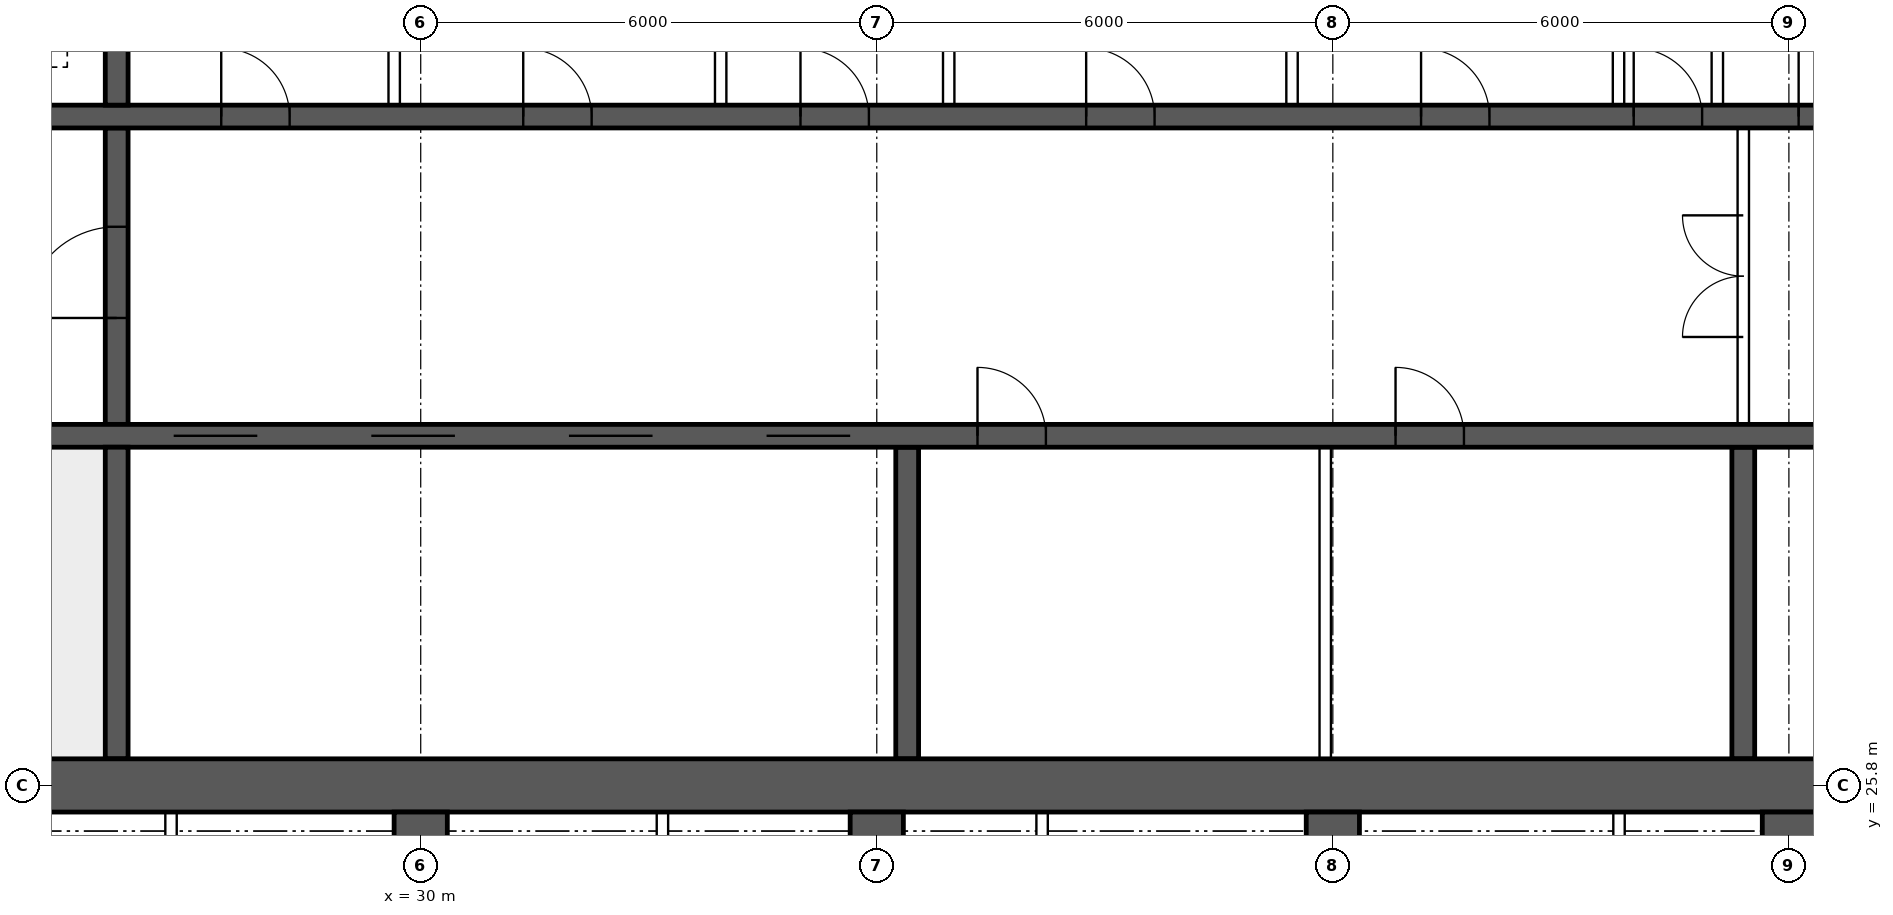
"""IFC4 building model, lengths in metres.
Left out: names, types, materials, properties, quantities, classifications, styles, units other than length and angle.
Written with IfcOpenShell. Run it as: python <this file> out.ifc"""

import sys

from ifc_helpers import new_model, si_unit, direction, frame, frame_2d, origin, place, context, subcontext, project, spatial, rectangle, extrude, element, fill, save


model = new_model("IFC4")
c1 = context("Model", 3, precision=1e-05, world=origin(), true_north=direction((0.0, 1.0)))
c2 = subcontext(c1, "Body", "Model", "MODEL_VIEW")
j1 = project(units=[si_unit("LENGTHUNIT", "METRE"), si_unit("PLANEANGLEUNIT", "RADIAN")], contexts=[c1])
p1 = place(None, origin())
s1 = spatial("IfcSite", under=j1, at=p1, CompositionType="ELEMENT")
p2 = place(p1, origin())
s2 = spatial("IfcBuilding", under=s1, at=p2, CompositionType="ELEMENT")
p3 = place(p2, frame((0.0, 0.0, 242.8)))
s3 = spatial("IfcBuildingStorey", under=s2, at=p3, CompositionType="ELEMENT", Elevation=242.8)
p4 = place(p3, frame((18.0, 25.8, 0.0), z_axis=(0.0, 0.0, 1.0), x_axis=(1.0, 0.0, 0.0)))
e1 = element("IfcWall", 1, at=p4, inside=s3, PredefinedType="SHEAR", context=c2, shape_type="SweptSolid", body=[
    extrude(rectangle(XDim=48.0, YDim=0.7, at=frame_2d((24.0, 0.0))), origin(), (0.0, 0.0, 1.0), 3.75),
])
p5 = place(p3, frame((18.35, 30.4, 0.0), z_axis=(0.0, 0.0, 1.0), x_axis=(1.0, 0.0, 0.0)))
e2 = element("IfcWall", 2, at=p5, inside=s3, PredefinedType="SHEAR", context=c2, shape_type="SweptSolid", body=[
    extrude(rectangle(XDim=47.3, YDim=0.3, at=frame_2d((23.65, 0.0))), origin(), (0.0, 0.0, 1.0), 3.75),
])
p6 = place(p5, frame((0.4, 0.0, 0.0)))
e3 = element("IfcOpeningElement", 3, at=p6, cuts=e2, PredefinedType="OPENING", context=c2, shape_type="SweptSolid", body=[
    extrude(rectangle(XDim=1.0, YDim=2.1, at=frame_2d((0.5, 1.05))), frame((0.0, 0.16, 0.0), z_axis=(0.0, -1.0, 0.0), x_axis=(1.0, 0.0, 0.0)), (0.0, 0.0, 1.0), 0.32),
])
p7 = place(p5, frame((45.9, 0.0, 0.0)))
e4 = element("IfcOpeningElement", 4, at=p7, cuts=e2, PredefinedType="OPENING", context=c2, shape_type="SweptSolid", body=[
    extrude(rectangle(XDim=1.0, YDim=2.1, at=frame_2d((0.5, 1.05))), frame((0.0, 0.16, 0.0), z_axis=(0.0, -1.0, 0.0), x_axis=(1.0, 0.0, 0.0)), (0.0, 0.0, 1.0), 0.32),
])
p8 = place(p5, frame((8.4, 0.0, 0.0)))
e5 = element("IfcOpeningElement", 5, at=p8, cuts=e2, PredefinedType="OPENING", context=c2, shape_type="SweptSolid", body=[
    extrude(rectangle(XDim=1.1, YDim=2.1, at=frame_2d((0.55, 1.05))), frame((0.0, 0.16, 0.0), z_axis=(0.0, -1.0, 0.0), x_axis=(1.0, 0.0, 0.0)), (0.0, 0.0, 1.0), 0.32),
])
p9 = place(p5, frame((11.0, 0.0, 0.0)))
e6 = element("IfcOpeningElement", 6, at=p9, cuts=e2, PredefinedType="OPENING", context=c2, shape_type="SweptSolid", body=[
    extrude(rectangle(XDim=1.1, YDim=2.1, at=frame_2d((0.55, 1.05))), frame((0.0, 0.16, 0.0), z_axis=(0.0, -1.0, 0.0), x_axis=(1.0, 0.0, 0.0)), (0.0, 0.0, 1.0), 0.32),
])
p10 = place(p5, frame((13.6, 0.0, 0.0)))
e7 = element("IfcOpeningElement", 7, at=p10, cuts=e2, PredefinedType="OPENING", context=c2, shape_type="SweptSolid", body=[
    extrude(rectangle(XDim=1.1, YDim=2.1, at=frame_2d((0.55, 1.05))), frame((0.0, 0.16, 0.0), z_axis=(0.0, -1.0, 0.0), x_axis=(1.0, 0.0, 0.0)), (0.0, 0.0, 1.0), 0.32),
])
p11 = place(p5, frame((16.2, 0.0, 0.0)))
e8 = element("IfcOpeningElement", 8, at=p11, cuts=e2, PredefinedType="OPENING", context=c2, shape_type="SweptSolid", body=[
    extrude(rectangle(XDim=1.1, YDim=2.1, at=frame_2d((0.55, 1.05))), frame((0.0, 0.16, 0.0), z_axis=(0.0, -1.0, 0.0), x_axis=(1.0, 0.0, 0.0)), (0.0, 0.0, 1.0), 0.32),
])
p12 = place(p5, frame((18.975, 0.0, 0.0)))
e9 = element("IfcOpeningElement", 9, at=p12, cuts=e2, PredefinedType="OPENING", context=c2, shape_type="SweptSolid", body=[
    extrude(rectangle(XDim=0.9, YDim=2.1, at=frame_2d((0.45, 1.05))), frame((0.0, 0.16, 0.0), z_axis=(0.0, -1.0, 0.0), x_axis=(1.0, 0.0, 0.0)), (0.0, 0.0, 1.0), 0.32),
])
p13 = place(p5, frame((24.475, 0.0, 0.0)))
e10 = element("IfcOpeningElement", 10, at=p13, cuts=e2, PredefinedType="OPENING", context=c2, shape_type="SweptSolid", body=[
    extrude(rectangle(XDim=0.9, YDim=2.1, at=frame_2d((0.45, 1.05))), frame((0.0, 0.16, 0.0), z_axis=(0.0, -1.0, 0.0), x_axis=(1.0, 0.0, 0.0)), (0.0, 0.0, 1.0), 0.32),
])
p14 = place(p5, frame((30.267, 0.0, 0.0)))
e11 = element("IfcOpeningElement", 11, at=p14, cuts=e2, PredefinedType="OPENING", context=c2, shape_type="SweptSolid", body=[
    extrude(rectangle(XDim=1.1, YDim=2.1, at=frame_2d((0.55, 1.05))), frame((0.0, 0.16, 0.0), z_axis=(0.0, -1.0, 0.0), x_axis=(1.0, 0.0, 0.0)), (0.0, 0.0, 1.0), 0.32),
])
p15 = place(p5, frame((33.8, 0.0, 0.0)))
e12 = element("IfcOpeningElement", 12, at=p15, cuts=e2, PredefinedType="OPENING", context=c2, shape_type="SweptSolid", body=[
    extrude(rectangle(XDim=1.1, YDim=2.1, at=frame_2d((0.55, 1.05))), frame((0.0, 0.16, 0.0), z_axis=(0.0, -1.0, 0.0), x_axis=(1.0, 0.0, 0.0)), (0.0, 0.0, 1.0), 0.32),
])
p16 = place(p5, frame((37.333, 0.0, 0.0)))
e13 = element("IfcOpeningElement", 13, at=p16, cuts=e2, PredefinedType="OPENING", context=c2, shape_type="SweptSolid", body=[
    extrude(rectangle(XDim=1.1, YDim=2.1, at=frame_2d((0.55, 1.05))), frame((0.0, 0.16, 0.0), z_axis=(0.0, -1.0, 0.0), x_axis=(1.0, 0.0, 0.0)), (0.0, 0.0, 1.0), 0.32),
])
p17 = place(p3, frame((18.35, 34.6, 0.0), z_axis=(0.0, 0.0, 1.0), x_axis=(1.0, 0.0, 0.0)))
e14 = element("IfcWall", 14, at=p17, inside=s3, PredefinedType="SHEAR", context=c2, shape_type="SweptSolid", body=[
    extrude(rectangle(XDim=47.3, YDim=0.3, at=frame_2d((23.65, 0.0))), origin(), (0.0, 0.0, 1.0), 3.75),
])
p18 = place(p17, frame((0.9, 0.0, 0.0)))
e15 = element("IfcOpeningElement", 15, at=p18, cuts=e14, PredefinedType="OPENING", context=c2, shape_type="SweptSolid", body=[
    extrude(rectangle(XDim=1.1, YDim=2.1, at=frame_2d((0.55, 1.05))), frame((0.0, 0.16, 0.0), z_axis=(0.0, -1.0, 0.0), x_axis=(1.0, 0.0, 0.0)), (0.0, 0.0, 1.0), 0.32),
])
p19 = place(p17, frame((45.3, 0.0, 0.0)))
e16 = element("IfcOpeningElement", 16, at=p19, cuts=e14, PredefinedType="OPENING", context=c2, shape_type="SweptSolid", body=[
    extrude(rectangle(XDim=1.1, YDim=2.1, at=frame_2d((0.55, 1.05))), frame((0.0, 0.16, 0.0), z_axis=(0.0, -1.0, 0.0), x_axis=(1.0, 0.0, 0.0)), (0.0, 0.0, 1.0), 0.32),
])
p20 = place(p17, frame((4.25, 0.0, 0.0)))
e17 = element("IfcOpeningElement", 17, at=p20, cuts=e14, PredefinedType="OPENING", context=c2, shape_type="SweptSolid", body=[
    extrude(rectangle(XDim=0.9, YDim=2.1, at=frame_2d((0.45, 1.05))), frame((0.0, 0.16, 0.0), z_axis=(0.0, -1.0, 0.0), x_axis=(1.0, 0.0, 0.0)), (0.0, 0.0, 1.0), 0.32),
])
p21 = place(p17, frame((42.15, 0.0, 0.0)))
e18 = element("IfcOpeningElement", 18, at=p21, cuts=e14, PredefinedType="OPENING", context=c2, shape_type="SweptSolid", body=[
    extrude(rectangle(XDim=0.9, YDim=2.1, at=frame_2d((0.45, 1.05))), frame((0.0, 0.16, 0.0), z_axis=(0.0, -1.0, 0.0), x_axis=(1.0, 0.0, 0.0)), (0.0, 0.0, 1.0), 0.32),
])
p22 = place(p17, frame((9.025, 0.0, 0.0)))
e19 = element("IfcOpeningElement", 19, at=p22, cuts=e14, PredefinedType="OPENING", context=c2, shape_type="SweptSolid", body=[
    extrude(rectangle(XDim=0.9, YDim=2.1, at=frame_2d((0.45, 1.05))), frame((0.0, 0.16, 0.0), z_axis=(0.0, -1.0, 0.0), x_axis=(1.0, 0.0, 0.0)), (0.0, 0.0, 1.0), 0.32),
])
p23 = place(p17, frame((12.999, 0.0, 0.0)))
e20 = element("IfcOpeningElement", 20, at=p23, cuts=e14, PredefinedType="OPENING", context=c2, shape_type="SweptSolid", body=[
    extrude(rectangle(XDim=0.9, YDim=2.1, at=frame_2d((0.45, 1.05))), frame((0.0, 0.16, 0.0), z_axis=(0.0, -1.0, 0.0), x_axis=(1.0, 0.0, 0.0)), (0.0, 0.0, 1.0), 0.32),
])
p24 = place(p17, frame((16.646, 0.0, 0.0)))
e21 = element("IfcOpeningElement", 21, at=p24, cuts=e14, PredefinedType="OPENING", context=c2, shape_type="SweptSolid", body=[
    extrude(rectangle(XDim=0.9, YDim=2.1, at=frame_2d((0.45, 1.05))), frame((0.0, 0.16, 0.0), z_axis=(0.0, -1.0, 0.0), x_axis=(1.0, 0.0, 0.0)), (0.0, 0.0, 1.0), 0.32),
])
p25 = place(p17, frame((20.405, 0.0, 0.0)))
e22 = element("IfcOpeningElement", 22, at=p25, cuts=e14, PredefinedType="OPENING", context=c2, shape_type="SweptSolid", body=[
    extrude(rectangle(XDim=0.9, YDim=2.1, at=frame_2d((0.45, 1.05))), frame((0.0, 0.16, 0.0), z_axis=(0.0, -1.0, 0.0), x_axis=(1.0, 0.0, 0.0)), (0.0, 0.0, 1.0), 0.32),
])
p26 = place(p17, frame((24.811, 0.0, 0.0)))
e23 = element("IfcOpeningElement", 23, at=p26, cuts=e14, PredefinedType="OPENING", context=c2, shape_type="SweptSolid", body=[
    extrude(rectangle(XDim=0.9, YDim=2.1, at=frame_2d((0.45, 1.05))), frame((0.0, 0.16, 0.0), z_axis=(0.0, -1.0, 0.0), x_axis=(1.0, 0.0, 0.0)), (0.0, 0.0, 1.0), 0.32),
])
p27 = place(p17, frame((27.608, 0.0, 0.0)))
e24 = element("IfcOpeningElement", 24, at=p27, cuts=e14, PredefinedType="OPENING", context=c2, shape_type="SweptSolid", body=[
    extrude(rectangle(XDim=0.9, YDim=2.1, at=frame_2d((0.45, 1.05))), frame((0.0, 0.16, 0.0), z_axis=(0.0, -1.0, 0.0), x_axis=(1.0, 0.0, 0.0)), (0.0, 0.0, 1.0), 0.32),
])
p28 = place(p17, frame((29.778, 0.0, 0.0)))
e25 = element("IfcOpeningElement", 25, at=p28, cuts=e14, PredefinedType="OPENING", context=c2, shape_type="SweptSolid", body=[
    extrude(rectangle(XDim=0.9, YDim=2.1, at=frame_2d((0.45, 1.05))), frame((0.0, 0.16, 0.0), z_axis=(0.0, -1.0, 0.0), x_axis=(1.0, 0.0, 0.0)), (0.0, 0.0, 1.0), 0.32),
])
p29 = place(p17, frame((33.577, 0.0, 0.0)))
e26 = element("IfcOpeningElement", 26, at=p29, cuts=e14, PredefinedType="OPENING", context=c2, shape_type="SweptSolid", body=[
    extrude(rectangle(XDim=0.9, YDim=2.1, at=frame_2d((0.45, 1.05))), frame((0.0, 0.16, 0.0), z_axis=(0.0, -1.0, 0.0), x_axis=(1.0, 0.0, 0.0)), (0.0, 0.0, 1.0), 0.32),
])
p30 = place(p17, frame((37.528, 0.0, 0.0)))
e27 = element("IfcOpeningElement", 27, at=p30, cuts=e14, PredefinedType="OPENING", context=c2, shape_type="SweptSolid", body=[
    extrude(rectangle(XDim=0.9, YDim=2.1, at=frame_2d((0.45, 1.05))), frame((0.0, 0.16, 0.0), z_axis=(0.0, -1.0, 0.0), x_axis=(1.0, 0.0, 0.0)), (0.0, 0.0, 1.0), 0.32),
])
p31 = place(p3, frame((26.0, 26.15, 0.0), z_axis=(0.0, 0.0, 1.0), x_axis=(0.0, 1.0, 0.0)))
e28 = element("IfcWall", 28, at=p31, inside=s3, PredefinedType="SHEAR", context=c2, shape_type="SweptSolid", body=[
    extrude(rectangle(XDim=4.1, YDim=0.3, at=frame_2d((2.05, 0.0))), origin(), (0.0, 0.0, 1.0), 3.75),
])
p32 = place(p3, frame((26.0, 30.55, 0.0), z_axis=(0.0, 0.0, 1.0), x_axis=(0.0, 1.0, 0.0)))
e29 = element("IfcWall", 29, at=p32, inside=s3, PredefinedType="SHEAR", context=c2, shape_type="SweptSolid", body=[
    extrude(rectangle(XDim=3.9, YDim=0.3, at=frame_2d((1.95, 0.0))), origin(), (0.0, 0.0, 1.0), 3.75),
])
p33 = place(p32, frame((1.4, 0.0, 0.0)))
e30 = element("IfcOpeningElement", 30, at=p33, cuts=e29, PredefinedType="OPENING", context=c2, shape_type="SweptSolid", body=[
    extrude(rectangle(XDim=1.2, YDim=2.1, at=frame_2d((0.6, 1.05))), frame((0.0, 0.16, 0.0), z_axis=(0.0, -1.0, 0.0), x_axis=(1.0, 0.0, 0.0)), (0.0, 0.0, 1.0), 0.32),
])
p34 = place(p3, frame((26.0, 34.75, 0.0), z_axis=(0.0, 0.0, 1.0), x_axis=(0.0, 1.0, 0.0)))
e31 = element("IfcWall", 31, at=p34, inside=s3, PredefinedType="SHEAR", context=c2, shape_type="SweptSolid", body=[
    extrude(rectangle(XDim=3.1, YDim=0.3, at=frame_2d((1.55, 0.0))), origin(), (0.0, 0.0, 1.0), 3.75),
])
for number, where, z_axis, x_axis in (
    (32, (36.4, 26.15, 0.0), (0.0, 0.0, 1.0), (0.0, 1.0, 0.0)),
    (33, (47.4, 26.15, 0.0), (0.0, 0.0, 1.0), (0.0, 1.0, 0.0)),
):
    element("IfcWall", number, at=place(p3, frame(where, z_axis=z_axis, x_axis=x_axis)), inside=s3, PredefinedType="SHEAR", context=c2, shape_type="SweptSolid", body=[
        extrude(rectangle(XDim=4.1, YDim=0.3, at=frame_2d((2.05, 0.0))), origin(), (0.0, 0.0, 1.0), 3.75),
    ])
for number, where, z_axis, x_axis in (
    (34, (30.0, 18.4, 0.0), (0.0, 0.0, 1.0), (0.0, 1.0, 0.0)),
    (35, (36.0, 18.4, 0.0), (0.0, 0.0, 1.0), (0.0, 1.0, 0.0)),
    (36, (42.0, 18.4, 0.0), (0.0, 0.0, 1.0), (0.0, 1.0, 0.0)),
    (37, (48.0, 18.4, 0.0), (0.0, 0.0, 1.0), (0.0, 1.0, 0.0)),
):
    element("IfcWall", number, at=place(p3, frame(where, z_axis=z_axis, x_axis=x_axis)), inside=s3, PredefinedType="SHEAR", context=c2, shape_type="SweptSolid", body=[
        extrude(rectangle(XDim=7.05, YDim=0.7, at=frame_2d((3.525, 0.0))), origin(), (0.0, 0.0, 1.0), 3.75),
    ])
p35 = place(p3, frame((47.4, 30.55, 0.0), z_axis=(0.0, 0.0, 1.0), x_axis=(0.0, 1.0, 0.0)))
e38 = element("IfcWall", 38, at=p35, inside=s3, PredefinedType="SOLIDWALL", context=c2, shape_type="SweptSolid", body=[
    extrude(rectangle(XDim=3.9, YDim=0.15, at=frame_2d((1.95, 0.0))), origin(), (0.0, 0.0, 1.0), 3.3),
])
p36 = place(p35, frame((1.15, 0.0, 0.0)))
e39 = element("IfcOpeningElement", 39, at=p36, cuts=e38, PredefinedType="OPENING", context=c2, shape_type="SweptSolid", body=[
    extrude(rectangle(XDim=1.6, YDim=2.1, at=frame_2d((0.8, 1.05))), frame((0.0, 0.085, 0.0), z_axis=(0.0, -1.0, 0.0), x_axis=(1.0, 0.0, 0.0)), (0.0, 0.0, 1.0), 0.17),
])
for number, where, z_axis, x_axis in (
    (40, (29.651, 34.75, 0.0), (0.0, 0.0, 1.0), (0.0, 1.0, 0.0)),
    (41, (33.946, 34.75, 0.0), (0.0, 0.0, 1.0), (0.0, 1.0, 0.0)),
    (42, (36.946, 34.75, 0.0), (0.0, 0.0, 1.0), (0.0, 1.0, 0.0)),
    (43, (41.463, 34.75, 0.0), (0.0, 0.0, 1.0), (0.0, 1.0, 0.0)),
    (44, (45.758, 34.75, 0.0), (0.0, 0.0, 1.0), (0.0, 1.0, 0.0)),
    (45, (47.058, 34.75, 0.0), (0.0, 0.0, 1.0), (0.0, 1.0, 0.0)),
):
    element("IfcWall", number, at=place(p3, frame(where, z_axis=z_axis, x_axis=x_axis)), inside=s3, PredefinedType="SOLIDWALL", context=c2, shape_type="SweptSolid", body=[
        extrude(rectangle(XDim=3.1, YDim=0.15, at=frame_2d((1.55, 0.0))), origin(), (0.0, 0.0, 1.0), 3.3),
    ])
p37 = place(p3, frame((41.9, 26.15, 0.0), z_axis=(0.0, 0.0, 1.0), x_axis=(0.0, 1.0, 0.0)))
e46 = element("IfcWall", 46, at=p37, inside=s3, PredefinedType="SOLIDWALL", context=c2, shape_type="SweptSolid", body=[
    extrude(rectangle(XDim=4.1, YDim=0.15, at=frame_2d((2.05, 0.0))), origin(), (0.0, 0.0, 1.0), 3.3),
])
for number, where, z_axis, x_axis in (
    (47, (26.715, 18.5, 0.0), (0.0, 0.0, 1.0), (0.0, 1.0, 0.0)),
    (48, (33.18, 18.5, 0.0), (0.0, 0.0, 1.0), (0.0, 1.0, 0.0)),
    (49, (38.175, 18.5, 0.0), (0.0, 0.0, 1.0), (0.0, 1.0, 0.0)),
    (50, (45.765, 18.5, 0.0), (0.0, 0.0, 1.0), (0.0, 1.0, 0.0)),
):
    element("IfcWall", number, at=place(p3, frame(where, z_axis=z_axis, x_axis=x_axis)), inside=s3, PredefinedType="PARTITIONING", context=c2, shape_type="SweptSolid", body=[
        extrude(rectangle(XDim=6.95, YDim=0.15, at=frame_2d((3.475, 0.0))), origin(), (0.0, 0.0, 1.0), 3.3),
    ])
p38 = place(p36, origin())
e51 = element("IfcDoor", 51, at=p38, inside=s3, OperationType="DOUBLE_DOOR_SINGLE_SWING", PredefinedType="DOOR", context=c2, shape_type="SweptSolid", body=[
    extrude(rectangle(XDim=1.6, YDim=2.1, at=frame_2d((0.8, 1.05))), frame((0.0, 0.025, 0.0), z_axis=(0.0, -1.0, 0.0), x_axis=(1.0, 0.0, 0.0)), (0.0, 0.0, 1.0), 0.05),
])
fill(e39, e51)
p39 = place(p33, origin())
e52 = element("IfcDoor", 52, at=p39, inside=s3, OperationType="SINGLE_SWING_LEFT", PredefinedType="DOOR", context=c2, shape_type="SweptSolid", body=[
    extrude(rectangle(XDim=1.2, YDim=2.1, at=frame_2d((0.6, 1.05))), frame((0.0, 0.025, 0.0), z_axis=(0.0, -1.0, 0.0), x_axis=(1.0, 0.0, 0.0)), (0.0, 0.0, 1.0), 0.05),
])
fill(e30, e52)
p40 = place(p22, origin())
e53 = element("IfcDoor", 53, at=p40, inside=s3, OperationType="SINGLE_SWING_LEFT", PredefinedType="DOOR", context=c2, shape_type="SweptSolid", body=[
    extrude(rectangle(XDim=0.9, YDim=2.1, at=frame_2d((0.45, 1.05))), frame((0.0, 0.025, 0.0), z_axis=(0.0, -1.0, 0.0), x_axis=(1.0, 0.0, 0.0)), (0.0, 0.0, 1.0), 0.05),
])
fill(e19, e53)
p41 = place(p23, origin())
e54 = element("IfcDoor", 54, at=p41, inside=s3, OperationType="SINGLE_SWING_LEFT", PredefinedType="DOOR", context=c2, shape_type="SweptSolid", body=[
    extrude(rectangle(XDim=0.9, YDim=2.1, at=frame_2d((0.45, 1.05))), frame((0.0, 0.025, 0.0), z_axis=(0.0, -1.0, 0.0), x_axis=(1.0, 0.0, 0.0)), (0.0, 0.0, 1.0), 0.05),
])
fill(e20, e54)
p42 = place(p24, origin())
e55 = element("IfcDoor", 55, at=p42, inside=s3, OperationType="SINGLE_SWING_LEFT", PredefinedType="DOOR", context=c2, shape_type="SweptSolid", body=[
    extrude(rectangle(XDim=0.9, YDim=2.1, at=frame_2d((0.45, 1.05))), frame((0.0, 0.025, 0.0), z_axis=(0.0, -1.0, 0.0), x_axis=(1.0, 0.0, 0.0)), (0.0, 0.0, 1.0), 0.05),
])
fill(e21, e55)
p43 = place(p25, origin())
e56 = element("IfcDoor", 56, at=p43, inside=s3, OperationType="SINGLE_SWING_LEFT", PredefinedType="DOOR", context=c2, shape_type="SweptSolid", body=[
    extrude(rectangle(XDim=0.9, YDim=2.1, at=frame_2d((0.45, 1.05))), frame((0.0, 0.025, 0.0), z_axis=(0.0, -1.0, 0.0), x_axis=(1.0, 0.0, 0.0)), (0.0, 0.0, 1.0), 0.05),
])
fill(e22, e56)
p44 = place(p26, origin())
e57 = element("IfcDoor", 57, at=p44, inside=s3, OperationType="SINGLE_SWING_LEFT", PredefinedType="DOOR", context=c2, shape_type="SweptSolid", body=[
    extrude(rectangle(XDim=0.9, YDim=2.1, at=frame_2d((0.45, 1.05))), frame((0.0, 0.025, 0.0), z_axis=(0.0, -1.0, 0.0), x_axis=(1.0, 0.0, 0.0)), (0.0, 0.0, 1.0), 0.05),
])
fill(e23, e57)
p45 = place(p27, origin())
e58 = element("IfcDoor", 58, at=p45, inside=s3, OperationType="SINGLE_SWING_LEFT", PredefinedType="DOOR", context=c2, shape_type="SweptSolid", body=[
    extrude(rectangle(XDim=0.9, YDim=2.1, at=frame_2d((0.45, 1.05))), frame((0.0, 0.025, 0.0), z_axis=(0.0, -1.0, 0.0), x_axis=(1.0, 0.0, 0.0)), (0.0, 0.0, 1.0), 0.05),
])
fill(e24, e58)
p46 = place(p28, origin())
e59 = element("IfcDoor", 59, at=p46, inside=s3, OperationType="SINGLE_SWING_LEFT", PredefinedType="DOOR", context=c2, shape_type="SweptSolid", body=[
    extrude(rectangle(XDim=0.9, YDim=2.1, at=frame_2d((0.45, 1.05))), frame((0.0, 0.025, 0.0), z_axis=(0.0, -1.0, 0.0), x_axis=(1.0, 0.0, 0.0)), (0.0, 0.0, 1.0), 0.05),
])
fill(e25, e59)
p47 = place(p8, origin())
e60 = element("IfcDoor", 60, at=p47, inside=s3, OperationType="DOUBLE_DOOR_SLIDING", PredefinedType="DOOR", context=c2, shape_type="SweptSolid", body=[
    extrude(rectangle(XDim=1.1, YDim=2.1, at=frame_2d((0.55, 1.05))), frame((0.0, 0.025, 0.0), z_axis=(0.0, -1.0, 0.0), x_axis=(1.0, 0.0, 0.0)), (0.0, 0.0, 1.0), 0.05),
])
fill(e5, e60)
p48 = place(p9, origin())
e61 = element("IfcDoor", 61, at=p48, inside=s3, OperationType="DOUBLE_DOOR_SLIDING", PredefinedType="DOOR", context=c2, shape_type="SweptSolid", body=[
    extrude(rectangle(XDim=1.1, YDim=2.1, at=frame_2d((0.55, 1.05))), frame((0.0, 0.025, 0.0), z_axis=(0.0, -1.0, 0.0), x_axis=(1.0, 0.0, 0.0)), (0.0, 0.0, 1.0), 0.05),
])
fill(e6, e61)
p49 = place(p10, origin())
e62 = element("IfcDoor", 62, at=p49, inside=s3, OperationType="DOUBLE_DOOR_SLIDING", PredefinedType="DOOR", context=c2, shape_type="SweptSolid", body=[
    extrude(rectangle(XDim=1.1, YDim=2.1, at=frame_2d((0.55, 1.05))), frame((0.0, 0.025, 0.0), z_axis=(0.0, -1.0, 0.0), x_axis=(1.0, 0.0, 0.0)), (0.0, 0.0, 1.0), 0.05),
])
fill(e7, e62)
p50 = place(p11, origin())
e63 = element("IfcDoor", 63, at=p50, inside=s3, OperationType="DOUBLE_DOOR_SLIDING", PredefinedType="DOOR", context=c2, shape_type="SweptSolid", body=[
    extrude(rectangle(XDim=1.1, YDim=2.1, at=frame_2d((0.55, 1.05))), frame((0.0, 0.025, 0.0), z_axis=(0.0, -1.0, 0.0), x_axis=(1.0, 0.0, 0.0)), (0.0, 0.0, 1.0), 0.05),
])
fill(e8, e63)
p51 = place(p12, origin())
e64 = element("IfcDoor", 64, at=p51, inside=s3, OperationType="SINGLE_SWING_LEFT", PredefinedType="DOOR", context=c2, shape_type="SweptSolid", body=[
    extrude(rectangle(XDim=0.9, YDim=2.1, at=frame_2d((0.45, 1.05))), frame((0.0, 0.025, 0.0), z_axis=(0.0, -1.0, 0.0), x_axis=(1.0, 0.0, 0.0)), (0.0, 0.0, 1.0), 0.05),
])
fill(e9, e64)
p52 = place(p13, origin())
e65 = element("IfcDoor", 65, at=p52, inside=s3, OperationType="SINGLE_SWING_LEFT", PredefinedType="DOOR", context=c2, shape_type="SweptSolid", body=[
    extrude(rectangle(XDim=0.9, YDim=2.1, at=frame_2d((0.45, 1.05))), frame((0.0, 0.025, 0.0), z_axis=(0.0, -1.0, 0.0), x_axis=(1.0, 0.0, 0.0)), (0.0, 0.0, 1.0), 0.05),
])
fill(e10, e65)
save(model, sys.argv[1])
